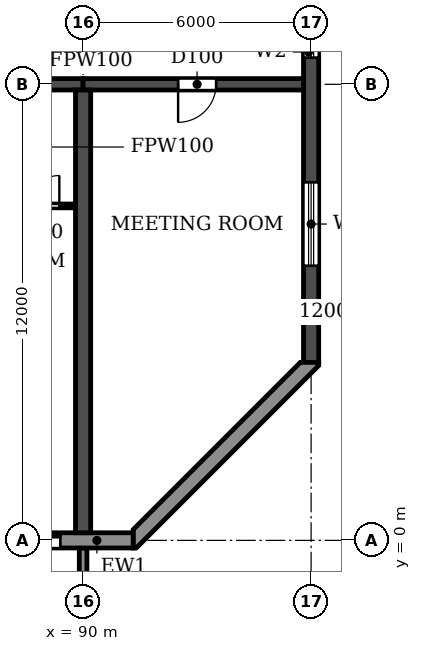
"""IFC4 building model, lengths in metres.
Left out: names, types, materials, properties, quantities, classifications, styles, units other than length and angle.
Written with IfcOpenShell. Run it as: python <this file> out.ifc"""

import sys

from ifc_helpers import new_model, si_unit, direction, frame, frame_2d, origin, place, context, subcontext, project, spatial, polyline, rectangle, outline, extrude, source, transform, mapped, element, fill, save


model = new_model("IFC4")
c1 = context("Model", 3, precision=1e-05, world=origin(), true_north=direction((0.0, 1.0)))
c2 = subcontext(c1, "Body", "Model", "MODEL_VIEW")
j1 = project(units=[si_unit("LENGTHUNIT", "METRE"), si_unit("PLANEANGLEUNIT", "RADIAN")], contexts=[c1])
p1 = place(None, origin())
s1 = spatial("IfcSite", under=j1, at=p1, CompositionType="ELEMENT")
p2 = place(p1, origin())
s2 = spatial("IfcBuilding", under=s1, at=p2, CompositionType="ELEMENT")
p3 = place(p2, frame((0.0, 0.0, 63.0)))
s3 = spatial("IfcBuildingStorey", under=s2, at=p3, CompositionType="ELEMENT", Elevation=63.0)
p4 = place(p3, frame((90.0, 0.2, 0.0), z_axis=(0.0, 0.0, 1.0), x_axis=(0.0, 1.0, 0.0)))
e1 = element("IfcWall", 1, at=p4, inside=s3, PredefinedType="SHEAR", context=c2, shape_type="SweptSolid", body=[
    extrude(rectangle(XDim=11.65, YDim=0.4, at=frame_2d((5.825, 0.0))), origin(), (0.0, 0.0, 1.0), 2.95),
])
p5 = place(p3, frame((96.0, 4.683, 0.0), z_axis=(0.0, 0.0, 1.0), x_axis=(0.0, 1.0, 0.0)))
e2 = element("IfcWall", 2, at=p5, inside=s3, PredefinedType="SHEAR", context=c2, shape_type="SweptSolid", body=[
    extrude(rectangle(XDim=35.434, YDim=0.4, at=frame_2d((17.717, 0.0))), origin(), (0.0, 0.0, 1.0), 2.95),
])
p6 = place(p5, frame((15.917, 0.0, 0.9)))
e3 = element("IfcOpeningElement", 3, at=p6, cuts=e2, PredefinedType="OPENING", context=c2, shape_type="SweptSolid", body=[
    extrude(rectangle(XDim=1.2, YDim=1.5, at=frame_2d((0.6, 0.75))), frame((0.0, 0.21, 0.0), z_axis=(0.0, -1.0, 0.0), x_axis=(1.0, 0.0, 0.0)), (0.0, 0.0, 1.0), 0.42),
])
p7 = place(p5, frame((23.817, 0.0, 0.9)))
e4 = element("IfcOpeningElement", 4, at=p7, cuts=e2, PredefinedType="OPENING", context=c2, shape_type="SweptSolid", body=[
    extrude(rectangle(XDim=1.2, YDim=1.5, at=frame_2d((0.6, 0.75))), frame((0.0, 0.21, 0.0), z_axis=(0.0, -1.0, 0.0), x_axis=(1.0, 0.0, 0.0)), (0.0, 0.0, 1.0), 0.42),
])
p8 = place(p5, frame((8.017, 0.0, 0.9)))
e5 = element("IfcOpeningElement", 5, at=p8, cuts=e2, PredefinedType="OPENING", context=c2, shape_type="SweptSolid", body=[
    extrude(rectangle(XDim=1.2, YDim=1.5, at=frame_2d((0.6, 0.75))), frame((0.0, 0.21, 0.0), z_axis=(0.0, -1.0, 0.0), x_axis=(1.0, 0.0, 0.0)), (0.0, 0.0, 1.0), 0.42),
])
p9 = place(p5, frame((29.493, 0.0, 0.6)))
e6 = element("IfcOpeningElement", 6, at=p9, cuts=e2, PredefinedType="OPENING", context=c2, shape_type="SweptSolid", body=[
    extrude(rectangle(XDim=2.2, YDim=1.8, at=frame_2d((1.1, 0.9))), frame((0.0, 0.21, 0.0), z_axis=(0.0, -1.0, 0.0), x_axis=(1.0, 0.0, 0.0)), (0.0, 0.0, 1.0), 0.42),
])
p10 = place(p5, frame((2.541, 0.0, 0.6)))
e7 = element("IfcOpeningElement", 7, at=p10, cuts=e2, PredefinedType="OPENING", context=c2, shape_type="SweptSolid", body=[
    extrude(rectangle(XDim=2.2, YDim=1.8, at=frame_2d((1.1, 0.9))), frame((0.0, 0.21, 0.0), z_axis=(0.0, -1.0, 0.0), x_axis=(1.0, 0.0, 0.0)), (0.0, 0.0, 1.0), 0.42),
])
p11 = place(p3, frame((84.0, 12.0, 0.0), z_axis=(0.0, 0.0, 1.0), x_axis=(1.0, 0.0, 0.0)))
e8 = element("IfcWall", 8, at=p11, inside=s3, PredefinedType="SHEAR", context=c2, shape_type="SweptSolid", body=[
    extrude(rectangle(XDim=6.0, YDim=0.3, at=frame_2d((3.0, 0.0))), origin(), (0.0, 0.0, 1.0), 2.35),
])
p12 = place(p11, frame((2.55, 0.0, 0.0)))
e9 = element("IfcOpeningElement", 9, at=p12, cuts=e8, PredefinedType="OPENING", context=c2, shape_type="SweptSolid", body=[
    extrude(rectangle(XDim=1.0, YDim=2.1, at=frame_2d((0.5, 1.05))), frame((0.0, 0.16, 0.0), z_axis=(0.0, -1.0, 0.0), x_axis=(1.0, 0.0, 0.0)), (0.0, 0.0, 1.0), 0.32),
])
p13 = place(p3, frame((90.0, 12.0, 0.0), z_axis=(0.0, 0.0, 1.0), x_axis=(1.0, 0.0, 0.0)))
e10 = element("IfcWall", 10, at=p13, inside=s3, PredefinedType="SHEAR", context=c2, shape_type="SweptSolid", body=[
    extrude(rectangle(XDim=5.8, YDim=0.3, at=frame_2d((2.9, 0.0))), origin(), (0.0, 0.0, 1.0), 2.35),
])
p14 = place(p13, frame((2.5, 0.0, 0.0)))
e11 = element("IfcOpeningElement", 11, at=p14, cuts=e10, PredefinedType="OPENING", context=c2, shape_type="SweptSolid", body=[
    extrude(rectangle(XDim=1.0, YDim=2.1, at=frame_2d((0.5, 1.05))), frame((0.0, 0.16, 0.0), z_axis=(0.0, -1.0, 0.0), x_axis=(1.0, 0.0, 0.0)), (0.0, 0.0, 1.0), 0.32),
])
p15 = place(p3, frame((10.683, 0.0, 0.0), z_axis=(0.0, 0.0, 1.0), x_axis=(1.0, 0.0, 0.0)))
e12 = element("IfcWall", 12, at=p15, inside=s3, PredefinedType="STANDARD", context=c2, shape_type="SweptSolid", body=[
    extrude(rectangle(XDim=80.634, YDim=0.4, at=frame_2d((40.317, 0.0))), origin(), (0.0, 0.0, 1.0), 2.95),
])
p16 = place(p15, frame((1.717, 0.0, 0.9)))
e13 = element("IfcOpeningElement", 13, at=p16, cuts=e12, PredefinedType="OPENING", context=c2, shape_type="SweptSolid", body=[
    extrude(rectangle(XDim=2.2, YDim=1.5, at=frame_2d((1.1, 0.75))), frame((0.0, 0.21, 0.0), z_axis=(0.0, -1.0, 0.0), x_axis=(1.0, 0.0, 0.0)), (0.0, 0.0, 1.0), 0.42),
])
p17 = place(p15, frame((4.917, 0.0, 0.0)))
e14 = element("IfcOpeningElement", 14, at=p17, cuts=e12, PredefinedType="OPENING", context=c2, shape_type="SweptSolid", body=[
    extrude(rectangle(XDim=1.8, YDim=2.4, at=frame_2d((0.9, 1.2))), frame((0.0, 0.21, 0.0), z_axis=(0.0, -1.0, 0.0), x_axis=(1.0, 0.0, 0.0)), (0.0, 0.0, 1.0), 0.42),
])
p18 = place(p15, frame((7.717, 0.0, 0.9)))
e15 = element("IfcOpeningElement", 15, at=p18, cuts=e12, PredefinedType="OPENING", context=c2, shape_type="SweptSolid", body=[
    extrude(rectangle(XDim=2.2, YDim=1.5, at=frame_2d((1.1, 0.75))), frame((0.0, 0.21, 0.0), z_axis=(0.0, -1.0, 0.0), x_axis=(1.0, 0.0, 0.0)), (0.0, 0.0, 1.0), 0.42),
])
p19 = place(p15, frame((10.717, 0.0, 0.9)))
e16 = element("IfcOpeningElement", 16, at=p19, cuts=e12, PredefinedType="OPENING", context=c2, shape_type="SweptSolid", body=[
    extrude(rectangle(XDim=2.2, YDim=1.5, at=frame_2d((1.1, 0.75))), frame((0.0, 0.21, 0.0), z_axis=(0.0, -1.0, 0.0), x_axis=(1.0, 0.0, 0.0)), (0.0, 0.0, 1.0), 0.42),
])
p20 = place(p15, frame((13.717, 0.0, 0.9)))
e17 = element("IfcOpeningElement", 17, at=p20, cuts=e12, PredefinedType="OPENING", context=c2, shape_type="SweptSolid", body=[
    extrude(rectangle(XDim=2.2, YDim=1.5, at=frame_2d((1.1, 0.75))), frame((0.0, 0.21, 0.0), z_axis=(0.0, -1.0, 0.0), x_axis=(1.0, 0.0, 0.0)), (0.0, 0.0, 1.0), 0.42),
])
p21 = place(p15, frame((16.917, 0.0, 0.0)))
e18 = element("IfcOpeningElement", 18, at=p21, cuts=e12, PredefinedType="OPENING", context=c2, shape_type="SweptSolid", body=[
    extrude(rectangle(XDim=1.8, YDim=2.4, at=frame_2d((0.9, 1.2))), frame((0.0, 0.21, 0.0), z_axis=(0.0, -1.0, 0.0), x_axis=(1.0, 0.0, 0.0)), (0.0, 0.0, 1.0), 0.42),
])
p22 = place(p15, frame((19.717, 0.0, 0.9)))
e19 = element("IfcOpeningElement", 19, at=p22, cuts=e12, PredefinedType="OPENING", context=c2, shape_type="SweptSolid", body=[
    extrude(rectangle(XDim=2.2, YDim=1.5, at=frame_2d((1.1, 0.75))), frame((0.0, 0.21, 0.0), z_axis=(0.0, -1.0, 0.0), x_axis=(1.0, 0.0, 0.0)), (0.0, 0.0, 1.0), 0.42),
])
p23 = place(p15, frame((22.717, 0.0, 0.9)))
e20 = element("IfcOpeningElement", 20, at=p23, cuts=e12, PredefinedType="OPENING", context=c2, shape_type="SweptSolid", body=[
    extrude(rectangle(XDim=2.2, YDim=1.5, at=frame_2d((1.1, 0.75))), frame((0.0, 0.21, 0.0), z_axis=(0.0, -1.0, 0.0), x_axis=(1.0, 0.0, 0.0)), (0.0, 0.0, 1.0), 0.42),
])
p24 = place(p15, frame((25.917, 0.0, 0.0)))
e21 = element("IfcOpeningElement", 21, at=p24, cuts=e12, PredefinedType="OPENING", context=c2, shape_type="SweptSolid", body=[
    extrude(rectangle(XDim=1.8, YDim=2.4, at=frame_2d((0.9, 1.2))), frame((0.0, 0.21, 0.0), z_axis=(0.0, -1.0, 0.0), x_axis=(1.0, 0.0, 0.0)), (0.0, 0.0, 1.0), 0.42),
])
p25 = place(p15, frame((28.717, 0.0, 0.9)))
e22 = element("IfcOpeningElement", 22, at=p25, cuts=e12, PredefinedType="OPENING", context=c2, shape_type="SweptSolid", body=[
    extrude(rectangle(XDim=2.2, YDim=1.5, at=frame_2d((1.1, 0.75))), frame((0.0, 0.21, 0.0), z_axis=(0.0, -1.0, 0.0), x_axis=(1.0, 0.0, 0.0)), (0.0, 0.0, 1.0), 0.42),
])
p26 = place(p15, frame((31.717, 0.0, 0.9)))
e23 = element("IfcOpeningElement", 23, at=p26, cuts=e12, PredefinedType="OPENING", context=c2, shape_type="SweptSolid", body=[
    extrude(rectangle(XDim=2.2, YDim=1.5, at=frame_2d((1.1, 0.75))), frame((0.0, 0.21, 0.0), z_axis=(0.0, -1.0, 0.0), x_axis=(1.0, 0.0, 0.0)), (0.0, 0.0, 1.0), 0.42),
])
p27 = place(p15, frame((34.717, 0.0, 0.9)))
e24 = element("IfcOpeningElement", 24, at=p27, cuts=e12, PredefinedType="OPENING", context=c2, shape_type="SweptSolid", body=[
    extrude(rectangle(XDim=2.2, YDim=1.5, at=frame_2d((1.1, 0.75))), frame((0.0, 0.21, 0.0), z_axis=(0.0, -1.0, 0.0), x_axis=(1.0, 0.0, 0.0)), (0.0, 0.0, 1.0), 0.42),
])
p28 = place(p15, frame((37.717, 0.0, 0.9)))
e25 = element("IfcOpeningElement", 25, at=p28, cuts=e12, PredefinedType="OPENING", context=c2, shape_type="SweptSolid", body=[
    extrude(rectangle(XDim=2.2, YDim=1.5, at=frame_2d((1.1, 0.75))), frame((0.0, 0.21, 0.0), z_axis=(0.0, -1.0, 0.0), x_axis=(1.0, 0.0, 0.0)), (0.0, 0.0, 1.0), 0.42),
])
p29 = place(p15, frame((40.917, 0.0, 0.0)))
e26 = element("IfcOpeningElement", 26, at=p29, cuts=e12, PredefinedType="OPENING", context=c2, shape_type="SweptSolid", body=[
    extrude(rectangle(XDim=1.8, YDim=2.4, at=frame_2d((0.9, 1.2))), frame((0.0, 0.21, 0.0), z_axis=(0.0, -1.0, 0.0), x_axis=(1.0, 0.0, 0.0)), (0.0, 0.0, 1.0), 0.42),
])
p30 = place(p15, frame((43.717, 0.0, 0.9)))
e27 = element("IfcOpeningElement", 27, at=p30, cuts=e12, PredefinedType="OPENING", context=c2, shape_type="SweptSolid", body=[
    extrude(rectangle(XDim=2.2, YDim=1.5, at=frame_2d((1.1, 0.75))), frame((0.0, 0.21, 0.0), z_axis=(0.0, -1.0, 0.0), x_axis=(1.0, 0.0, 0.0)), (0.0, 0.0, 1.0), 0.42),
])
p31 = place(p15, frame((46.717, 0.0, 0.9)))
e28 = element("IfcOpeningElement", 28, at=p31, cuts=e12, PredefinedType="OPENING", context=c2, shape_type="SweptSolid", body=[
    extrude(rectangle(XDim=2.2, YDim=1.5, at=frame_2d((1.1, 0.75))), frame((0.0, 0.21, 0.0), z_axis=(0.0, -1.0, 0.0), x_axis=(1.0, 0.0, 0.0)), (0.0, 0.0, 1.0), 0.42),
])
p32 = place(p15, frame((49.717, 0.0, 0.9)))
e29 = element("IfcOpeningElement", 29, at=p32, cuts=e12, PredefinedType="OPENING", context=c2, shape_type="SweptSolid", body=[
    extrude(rectangle(XDim=2.2, YDim=1.5, at=frame_2d((1.1, 0.75))), frame((0.0, 0.21, 0.0), z_axis=(0.0, -1.0, 0.0), x_axis=(1.0, 0.0, 0.0)), (0.0, 0.0, 1.0), 0.42),
])
p33 = place(p15, frame((52.717, 0.0, 0.9)))
e30 = element("IfcOpeningElement", 30, at=p33, cuts=e12, PredefinedType="OPENING", context=c2, shape_type="SweptSolid", body=[
    extrude(rectangle(XDim=2.2, YDim=1.5, at=frame_2d((1.1, 0.75))), frame((0.0, 0.21, 0.0), z_axis=(0.0, -1.0, 0.0), x_axis=(1.0, 0.0, 0.0)), (0.0, 0.0, 1.0), 0.42),
])
p34 = place(p15, frame((55.717, 0.0, 0.9)))
e31 = element("IfcOpeningElement", 31, at=p34, cuts=e12, PredefinedType="OPENING", context=c2, shape_type="SweptSolid", body=[
    extrude(rectangle(XDim=2.2, YDim=1.5, at=frame_2d((1.1, 0.75))), frame((0.0, 0.21, 0.0), z_axis=(0.0, -1.0, 0.0), x_axis=(1.0, 0.0, 0.0)), (0.0, 0.0, 1.0), 0.42),
])
p35 = place(p15, frame((58.717, 0.0, 0.9)))
e32 = element("IfcOpeningElement", 32, at=p35, cuts=e12, PredefinedType="OPENING", context=c2, shape_type="SweptSolid", body=[
    extrude(rectangle(XDim=2.2, YDim=1.5, at=frame_2d((1.1, 0.75))), frame((0.0, 0.21, 0.0), z_axis=(0.0, -1.0, 0.0), x_axis=(1.0, 0.0, 0.0)), (0.0, 0.0, 1.0), 0.42),
])
p36 = place(p15, frame((61.717, 0.0, 0.9)))
e33 = element("IfcOpeningElement", 33, at=p36, cuts=e12, PredefinedType="OPENING", context=c2, shape_type="SweptSolid", body=[
    extrude(rectangle(XDim=2.2, YDim=1.5, at=frame_2d((1.1, 0.75))), frame((0.0, 0.21, 0.0), z_axis=(0.0, -1.0, 0.0), x_axis=(1.0, 0.0, 0.0)), (0.0, 0.0, 1.0), 0.42),
])
p37 = place(p15, frame((64.917, 0.0, 0.0)))
e34 = element("IfcOpeningElement", 34, at=p37, cuts=e12, PredefinedType="OPENING", context=c2, shape_type="SweptSolid", body=[
    extrude(rectangle(XDim=1.8, YDim=2.4, at=frame_2d((0.9, 1.2))), frame((0.0, 0.21, 0.0), z_axis=(0.0, -1.0, 0.0), x_axis=(1.0, 0.0, 0.0)), (0.0, 0.0, 1.0), 0.42),
])
p38 = place(p15, frame((67.717, 0.0, 0.9)))
e35 = element("IfcOpeningElement", 35, at=p38, cuts=e12, PredefinedType="OPENING", context=c2, shape_type="SweptSolid", body=[
    extrude(rectangle(XDim=2.2, YDim=1.5, at=frame_2d((1.1, 0.75))), frame((0.0, 0.21, 0.0), z_axis=(0.0, -1.0, 0.0), x_axis=(1.0, 0.0, 0.0)), (0.0, 0.0, 1.0), 0.42),
])
p39 = place(p15, frame((70.717, 0.0, 0.9)))
e36 = element("IfcOpeningElement", 36, at=p39, cuts=e12, PredefinedType="OPENING", context=c2, shape_type="SweptSolid", body=[
    extrude(rectangle(XDim=2.2, YDim=1.5, at=frame_2d((1.1, 0.75))), frame((0.0, 0.21, 0.0), z_axis=(0.0, -1.0, 0.0), x_axis=(1.0, 0.0, 0.0)), (0.0, 0.0, 1.0), 0.42),
])
p40 = place(p15, frame((73.717, 0.0, 0.9)))
e37 = element("IfcOpeningElement", 37, at=p40, cuts=e12, PredefinedType="OPENING", context=c2, shape_type="SweptSolid", body=[
    extrude(rectangle(XDim=2.2, YDim=1.5, at=frame_2d((1.1, 0.75))), frame((0.0, 0.21, 0.0), z_axis=(0.0, -1.0, 0.0), x_axis=(1.0, 0.0, 0.0)), (0.0, 0.0, 1.0), 0.42),
])
p41 = place(p15, frame((76.917, 0.0, 0.0)))
e38 = element("IfcOpeningElement", 38, at=p41, cuts=e12, PredefinedType="OPENING", context=c2, shape_type="SweptSolid", body=[
    extrude(rectangle(XDim=1.8, YDim=2.4, at=frame_2d((0.9, 1.2))), frame((0.0, 0.21, 0.0), z_axis=(0.0, -1.0, 0.0), x_axis=(1.0, 0.0, 0.0)), (0.0, 0.0, 1.0), 0.42),
])
p42 = place(p3, origin())
e39 = element("IfcWall", 39, at=p42, inside=s3, PredefinedType="STANDARD", context=c2, shape_type="SweptSolid", body=[
    extrude(outline(polyline([(91.317, -0.2), (91.4, -0.2), (96.2, 4.6), (96.2, 4.683), (95.717, 4.683), (91.317, 0.283), (91.317, -0.2)])), origin(), (0.0, 0.0, 1.0), 2.95),
])
m1 = source(origin(), c2, "Body", "SweptSolid", [
    extrude(outline(polyline([(0.0, 0.0), (0.2, 0.0), (0.2, 1.65), (0.0, 1.65), (0.0, 0.0)])), origin(), (0.0, 0.0, 1.0), 3.1),
])
p43 = place(p3, frame((89.9, -1.85, 0.0)))
e40 = element("IfcWall", 40, at=p43, inside=s3, PredefinedType="STANDARD", context=c2, shape_type="MappedRepresentation", body=[
    mapped(m1, transform((0.0, 0.0, 0.0))),
])
p44 = place(p3, frame((87.9, 8.8, 0.0), z_axis=(0.0, 0.0, 1.0), x_axis=(1.0, 0.0, 0.0)))
e41 = element("IfcWall", 41, at=p44, inside=s3, PredefinedType="PARTITIONING", context=c2, shape_type="SweptSolid", body=[
    extrude(rectangle(XDim=1.89, YDim=0.1, at=frame_2d((0.945, 0.0))), origin(), (0.0, 0.0, 1.0), 2.95),
])
p45 = place(p44, frame((0.675, 0.0, 0.0)))
e42 = element("IfcOpeningElement", 42, at=p45, cuts=e41, PredefinedType="OPENING", context=c2, shape_type="SweptSolid", body=[
    extrude(rectangle(XDim=0.8, YDim=2.1, at=frame_2d((0.4, 1.05))), frame((0.0, 0.06, 0.0), z_axis=(0.0, -1.0, 0.0), x_axis=(1.0, 0.0, 0.0)), (0.0, 0.0, 1.0), 0.12),
])
p46 = place(p41, origin())
e43 = element("IfcDoor", 43, at=p46, inside=s3, OperationType="DOUBLE_DOOR_SLIDING", PredefinedType="DOOR", context=c2, shape_type="SweptSolid", body=[
    extrude(rectangle(XDim=1.8, YDim=2.4, at=frame_2d((0.9, 1.2))), frame((0.0, 0.025, 0.0), z_axis=(0.0, -1.0, 0.0), x_axis=(1.0, 0.0, 0.0)), (0.0, 0.0, 1.0), 0.05),
])
fill(e38, e43)
p47 = place(p8, origin())
e44 = element("IfcWindow", 44, at=p47, inside=s3, PartitioningType="SINGLE_PANEL", PredefinedType="WINDOW", context=c2, shape_type="SweptSolid", body=[
    extrude(rectangle(XDim=1.2, YDim=1.5, at=frame_2d((0.6, 0.75))), frame((0.0, 0.03, 0.0), z_axis=(0.0, -1.0, 0.0), x_axis=(1.0, 0.0, 0.0)), (0.0, 0.0, 1.0), 0.06),
])
fill(e5, e44)
p48 = place(p10, origin())
e45 = element("IfcWindow", 45, at=p48, inside=s3, PartitioningType="DOUBLE_PANEL_HORIZONTAL", PredefinedType="WINDOW", context=c2, shape_type="SweptSolid", body=[
    extrude(rectangle(XDim=2.2, YDim=1.8, at=frame_2d((1.1, 0.9))), frame((0.0, 0.03, 0.0), z_axis=(0.0, -1.0, 0.0), x_axis=(1.0, 0.0, 0.0)), (0.0, 0.0, 1.0), 0.06),
])
fill(e7, e45)
p49 = place(p45, origin())
e46 = element("IfcDoor", 46, at=p49, inside=s3, OperationType="SINGLE_SWING_RIGHT", PredefinedType="DOOR", context=c2, shape_type="SweptSolid", body=[
    extrude(rectangle(XDim=0.8, YDim=2.1, at=frame_2d((0.4, 1.05))), frame((0.0, 0.025, 0.0), z_axis=(0.0, -1.0, 0.0), x_axis=(1.0, 0.0, 0.0)), (0.0, 0.0, 1.0), 0.05),
])
fill(e42, e46)
p50 = place(p14, frame((1.0, 0.0, 0.0), z_axis=(0.0, 0.0, 1.0), x_axis=(-1.0, 0.0, 0.0)))
e47 = element("IfcDoor", 47, at=p50, inside=s3, OperationType="SINGLE_SWING_RIGHT", PredefinedType="DOOR", context=c2, shape_type="SweptSolid", body=[
    extrude(rectangle(XDim=1.0, YDim=2.1, at=frame_2d((0.5, 1.05))), frame((0.0, 0.025, 0.0), z_axis=(0.0, -1.0, 0.0), x_axis=(1.0, 0.0, 0.0)), (0.0, 0.0, 1.0), 0.05),
])
fill(e11, e47)
save(model, sys.argv[1])
